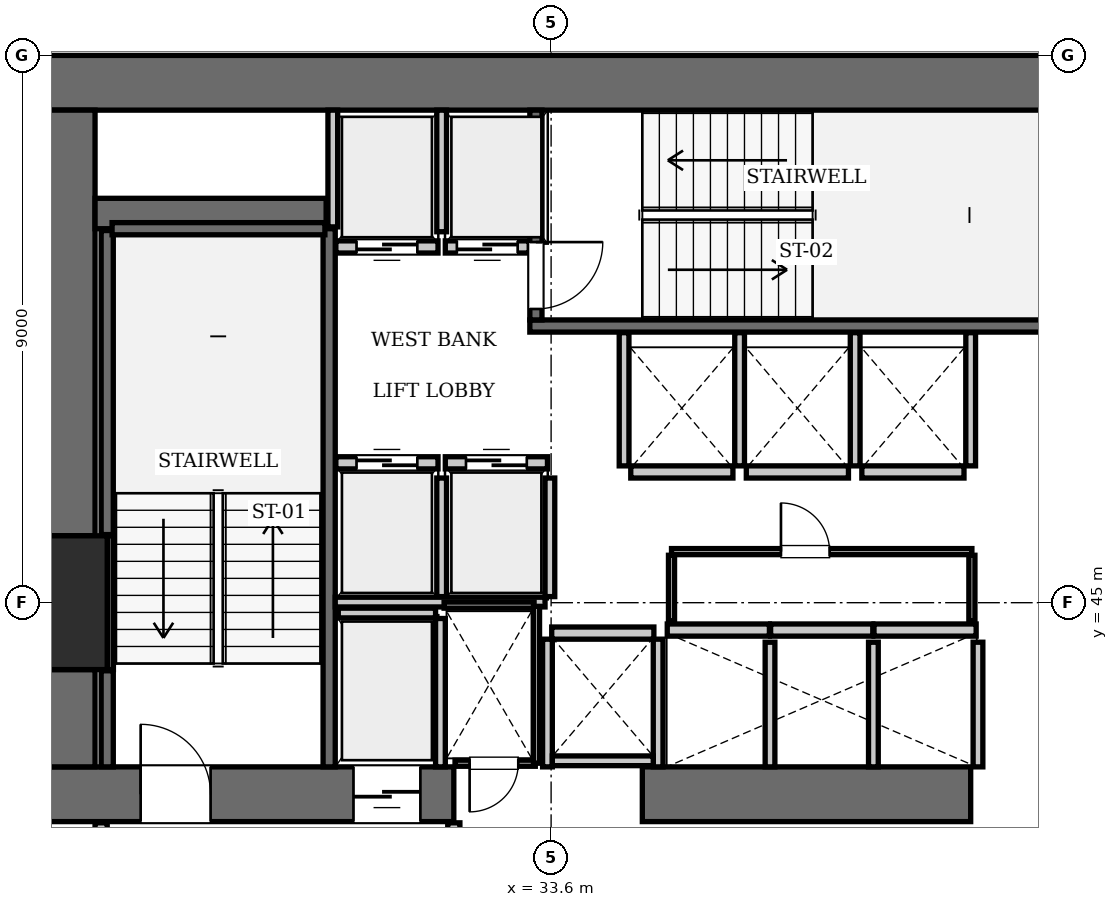
"""IFC4 building model, lengths in metres.
Left out: names, types, materials, properties, quantities, classifications, styles, units other than length and angle.
Written with IfcOpenShell. Run it as: python <this file> out.ifc"""

import sys

from ifc_helpers import new_model, si_unit, direction, frame, frame_2d, origin, origin_2d, place, context, subcontext, project, spatial, rectangle, extrude, element, fill, save


model = new_model("IFC4")
c1 = context("Model", 3, precision=1e-05, world=origin(), true_north=direction((0.0, 1.0)))
c2 = subcontext(c1, "Body", "Model", "MODEL_VIEW")
j1 = project(units=[si_unit("LENGTHUNIT", "METRE"), si_unit("PLANEANGLEUNIT", "RADIAN")], contexts=[c1])
p1 = place(None, origin())
s1 = spatial("IfcSite", under=j1, at=p1, CompositionType="ELEMENT")
p2 = place(p1, origin())
s2 = spatial("IfcBuilding", under=s1, at=p2, CompositionType="ELEMENT")
p3 = place(p2, frame((0.0, 0.0, 111.65)))
s3 = spatial("IfcBuildingStorey", under=s2, at=p3, CompositionType="ELEMENT", Elevation=111.65)
p4 = place(p3, frame((25.2, 45.0, 0.0), z_axis=(0.0, 0.0, 1.0), x_axis=(1.0, 0.0, 0.0)))
e1 = element("IfcColumn", 1, at=p4, inside=s3, PredefinedType="COLUMN", context=c2, shape_type="SweptSolid", body=[
    extrude(rectangle(XDim=2.2, YDim=2.2, at=origin_2d()), origin(), (0.0, 0.0, 1.0), 3.85),
])
p5 = place(p3, frame((25.2, 53.55, 0.0), z_axis=(0.0, 0.0, 1.0), x_axis=(1.0, 0.0, 0.0)))
e2 = element("IfcWall", 2, at=p5, inside=s3, PredefinedType="SHEAR", context=c2, shape_type="SweptSolid", body=[
    extrude(rectangle(XDim=25.2, YDim=0.9, at=frame_2d((12.6, 0.0))), origin(), (0.0, 0.0, 1.0), 3.85),
])
p6 = place(p3, frame((25.2, 41.85, 0.0), z_axis=(0.0, 0.0, 1.0), x_axis=(1.0, 0.0, 0.0)))
e3 = element("IfcWall", 3, at=p6, inside=s3, PredefinedType="SHEAR", context=c2, shape_type="SweptSolid", body=[
    extrude(rectangle(XDim=6.8, YDim=0.9, at=frame_2d((3.4, 0.0))), origin(), (0.0, 0.0, 1.0), 3.85),
])
p7 = place(p6, frame((1.65, 0.0, 0.0)))
e4 = element("IfcOpeningElement", 4, at=p7, cuts=e3, PredefinedType="OPENING", context=c2, shape_type="SweptSolid", body=[
    extrude(rectangle(XDim=1.15, YDim=2.15, at=frame_2d((0.575, 1.075))), frame((0.0, 0.46, 0.0), z_axis=(0.0, -1.0, 0.0), x_axis=(1.0, 0.0, 0.0)), (0.0, 0.0, 1.0), 0.92),
])
p8 = place(p6, frame((5.15, 0.0, 0.0)))
e5 = element("IfcOpeningElement", 5, at=p8, cuts=e3, PredefinedType="OPENING", context=c2, shape_type="SweptSolid", body=[
    extrude(rectangle(XDim=1.1, YDim=2.2, at=frame_2d((0.55, 1.1))), frame((0.0, 0.46, 0.0), z_axis=(0.0, -1.0, 0.0), x_axis=(1.0, 0.0, 0.0)), (0.0, 0.0, 1.0), 0.92),
])
p9 = place(p3, frame((35.1, 41.85, 0.0), z_axis=(0.0, 0.0, 1.0), x_axis=(1.0, 0.0, 0.0)))
e6 = element("IfcWall", 6, at=p9, inside=s3, PredefinedType="SHEAR", context=c2, shape_type="SweptSolid", body=[
    extrude(rectangle(XDim=5.4, YDim=0.9, at=frame_2d((2.7, 0.0))), origin(), (0.0, 0.0, 1.0), 3.85),
])
p10 = place(p3, frame((25.65, 42.3, 0.0), z_axis=(0.0, 0.0, 1.0), x_axis=(0.0, 1.0, 0.0)))
e7 = element("IfcWall", 7, at=p10, inside=s3, PredefinedType="SHEAR", context=c2, shape_type="SweptSolid", body=[
    extrude(rectangle(XDim=1.6, YDim=0.9, at=frame_2d((0.8, 0.0))), origin(), (0.0, 0.0, 1.0), 3.85),
])
p11 = place(p3, frame((25.65, 46.1, 0.0), z_axis=(0.0, 0.0, 1.0), x_axis=(0.0, 1.0, 0.0)))
e8 = element("IfcWall", 8, at=p11, inside=s3, PredefinedType="SHEAR", context=c2, shape_type="SweptSolid", body=[
    extrude(rectangle(XDim=7.0, YDim=0.9, at=frame_2d((3.5, 0.0))), origin(), (0.0, 0.0, 1.0), 3.85),
])
p12 = place(p3, frame((26.1, 51.4, 0.0), z_axis=(0.0, 0.0, 1.0), x_axis=(1.0, 0.0, 0.0)))
e9 = element("IfcWall", 9, at=p12, inside=s3, PredefinedType="SHEAR", context=c2, shape_type="SweptSolid", body=[
    extrude(rectangle(XDim=3.8, YDim=0.5, at=frame_2d((1.9, 0.0))), origin(), (0.0, 0.0, 1.0), 3.85),
])
p13 = place(p3, frame((29.95, 42.3, 0.0), z_axis=(0.0, 0.0, 1.0), x_axis=(0.0, 1.0, 0.0)))
e10 = element("IfcWall", 10, at=p13, inside=s3, PredefinedType="SOLIDWALL", context=c2, shape_type="SweptSolid", body=[
    extrude(rectangle(XDim=8.85, YDim=0.2, at=frame_2d((4.425, 0.0))), origin(), (0.0, 0.0, 1.0), 3.55),
])
p14 = place(p3, frame((26.3, 42.3, 0.0), z_axis=(0.0, 0.0, 1.0), x_axis=(0.0, 1.0, 0.0)))
e11 = element("IfcWall", 11, at=p14, inside=s3, PredefinedType="SOLIDWALL", context=c2, shape_type="SweptSolid", body=[
    extrude(rectangle(XDim=1.58, YDim=0.2, at=frame_2d((0.79, 0.0))), origin(), (0.0, 0.0, 1.0), 3.55),
])
p15 = place(p3, frame((26.3, 46.12, 0.0), z_axis=(0.0, 0.0, 1.0), x_axis=(0.0, 1.0, 0.0)))
e12 = element("IfcWall", 12, at=p15, inside=s3, PredefinedType="SOLIDWALL", context=c2, shape_type="SweptSolid", body=[
    extrude(rectangle(XDim=5.0, YDim=0.2, at=frame_2d((2.5, 0.0))), origin(), (0.0, 0.0, 1.0), 3.55),
])
p16 = place(p3, frame((26.38, 51.15, 0.0), z_axis=(0.0, 0.0, 1.0), x_axis=(1.0, 0.0, 0.0)))
e13 = element("IfcWall", 13, at=p16, inside=s3, PredefinedType="SOLIDWALL", context=c2, shape_type="SweptSolid", body=[
    extrude(rectangle(XDim=3.5, YDim=0.2, at=frame_2d((1.75, 0.0))), origin(), (0.0, 0.0, 1.0), 3.55),
])
p17 = place(p3, frame((26.352, 43.9, 0.0), z_axis=(0.0, 0.0, 1.0), x_axis=(0.0, 1.0, 0.0)))
e14 = element("IfcWall", 14, at=p17, inside=s3, PredefinedType="SOLIDWALL", context=c2, shape_type="SweptSolid", body=[
    extrude(rectangle(XDim=2.2, YDim=0.1, at=frame_2d((1.1, 0.0))), origin(), (0.0, 0.0, 1.0), 3.55),
])
p18 = place(p3, frame((33.25, 49.55, 0.0), z_axis=(0.0, 0.0, 1.0), x_axis=(1.0, 0.0, 0.0)))
e15 = element("IfcWall", 15, at=p18, inside=s3, PredefinedType="SOLIDWALL", context=c2, shape_type="SweptSolid", body=[
    extrude(rectangle(XDim=9.1, YDim=0.2, at=frame_2d((4.55, 0.0))), origin(), (0.0, 0.0, 1.0), 3.55),
])
p19 = place(p3, frame((33.35, 49.65, 0.0), z_axis=(0.0, 0.0, 1.0), x_axis=(0.0, 1.0, 0.0)))
e16 = element("IfcWall", 16, at=p19, inside=s3, PredefinedType="SOLIDWALL", context=c2, shape_type="SweptSolid", body=[
    extrude(rectangle(XDim=3.45, YDim=0.2, at=frame_2d((1.725, 0.0))), origin(), (0.0, 0.0, 1.0), 3.55),
])
p20 = place(p19, frame((0.18, 0.0, 0.0)))
e17 = element("IfcOpeningElement", 17, at=p20, cuts=e16, PredefinedType="OPENING", context=c2, shape_type="SweptSolid", body=[
    extrude(rectangle(XDim=1.1, YDim=2.15, at=frame_2d((0.55, 1.075))), frame((0.0, 0.11, 0.0), z_axis=(0.0, -1.0, 0.0), x_axis=(1.0, 0.0, 0.0)), (0.0, 0.0, 1.0), 0.22),
])
p21 = place(p3, frame((30.06, 47.3, 0.0), z_axis=(0.0, 0.0, 1.0), x_axis=(1.0, 0.0, 0.0)))
e18 = element("IfcWall", 18, at=p21, inside=s3, PredefinedType="SOLIDWALL", context=c2, shape_type="SweptSolid", body=[
    extrude(rectangle(XDim=1.68, YDim=0.2, at=frame_2d((0.84, 0.0))), origin(), (0.0, 0.0, 1.0), 3.55),
])
p22 = place(p21, frame((0.34, 0.0, 0.0)))
e19 = element("IfcOpeningElement", 19, at=p22, cuts=e18, PredefinedType="OPENING", context=c2, shape_type="SweptSolid", body=[
    extrude(rectangle(XDim=1.0, YDim=2.15, at=frame_2d((0.5, 1.075))), frame((0.0, 0.11, 0.0), z_axis=(0.0, -1.0, 0.0), x_axis=(1.0, 0.0, 0.0)), (0.0, 0.0, 1.0), 0.22),
])
p23 = place(p3, frame((31.86, 47.3, 0.0), z_axis=(0.0, 0.0, 1.0), x_axis=(1.0, 0.0, 0.0)))
e20 = element("IfcWall", 20, at=p23, inside=s3, PredefinedType="SOLIDWALL", context=c2, shape_type="SweptSolid", body=[
    extrude(rectangle(XDim=1.68, YDim=0.2, at=frame_2d((0.84, 0.0))), origin(), (0.0, 0.0, 1.0), 3.55),
])
p24 = place(p23, frame((0.34, 0.0, 0.0)))
e21 = element("IfcOpeningElement", 21, at=p24, cuts=e20, PredefinedType="OPENING", context=c2, shape_type="SweptSolid", body=[
    extrude(rectangle(XDim=1.0, YDim=2.15, at=frame_2d((0.5, 1.075))), frame((0.0, 0.11, 0.0), z_axis=(0.0, -1.0, 0.0), x_axis=(1.0, 0.0, 0.0)), (0.0, 0.0, 1.0), 0.22),
])
p25 = place(p3, frame((30.06, 50.85, 0.0), z_axis=(0.0, 0.0, 1.0), x_axis=(1.0, 0.0, 0.0)))
e22 = element("IfcWall", 22, at=p25, inside=s3, PredefinedType="SOLIDWALL", context=c2, shape_type="SweptSolid", body=[
    extrude(rectangle(XDim=1.68, YDim=0.2, at=frame_2d((0.84, 0.0))), origin(), (0.0, 0.0, 1.0), 3.55),
])
p26 = place(p25, frame((0.34, 0.0, 0.0)))
e23 = element("IfcOpeningElement", 23, at=p26, cuts=e22, PredefinedType="OPENING", context=c2, shape_type="SweptSolid", body=[
    extrude(rectangle(XDim=1.0, YDim=2.15, at=frame_2d((0.5, 1.075))), frame((0.0, 0.11, 0.0), z_axis=(0.0, -1.0, 0.0), x_axis=(1.0, 0.0, 0.0)), (0.0, 0.0, 1.0), 0.22),
])
p27 = place(p3, frame((31.86, 50.85, 0.0), z_axis=(0.0, 0.0, 1.0), x_axis=(1.0, 0.0, 0.0)))
e24 = element("IfcWall", 24, at=p27, inside=s3, PredefinedType="SOLIDWALL", context=c2, shape_type="SweptSolid", body=[
    extrude(rectangle(XDim=1.38, YDim=0.2, at=frame_2d((0.69, 0.0))), origin(), (0.0, 0.0, 1.0), 3.55),
])
p28 = place(p27, frame((0.19, 0.0, 0.0)))
e25 = element("IfcOpeningElement", 25, at=p28, cuts=e24, PredefinedType="OPENING", context=c2, shape_type="SweptSolid", body=[
    extrude(rectangle(XDim=1.0, YDim=2.15, at=frame_2d((0.5, 1.075))), frame((0.0, 0.11, 0.0), z_axis=(0.0, -1.0, 0.0), x_axis=(1.0, 0.0, 0.0)), (0.0, 0.0, 1.0), 0.22),
])
for number, where, z_axis, x_axis in (
    (26, (35.51, 44.55, 0.0), (0.0, 0.0, 1.0), (1.0, 0.0, 0.0)),
    (27, (37.21, 44.55, 0.0), (0.0, 0.0, 1.0), (1.0, 0.0, 0.0)),
):
    element("IfcWall", number, at=place(p3, frame(where, z_axis=z_axis, x_axis=x_axis)), inside=s3, PredefinedType="SOLIDWALL", context=c2, shape_type="SweptSolid", body=[
        extrude(rectangle(XDim=1.68, YDim=0.2, at=frame_2d((0.84, 0.0))), origin(), (0.0, 0.0, 1.0), 3.55),
    ])
for number, where, z_axis, x_axis in (
    (28, (38.91, 44.55, 0.0), (0.0, 0.0, 1.0), (1.0, 0.0, 0.0)),
    (29, (34.91, 47.15, 0.0), (0.0, 0.0, 1.0), (1.0, 0.0, 0.0)),
):
    element("IfcWall", number, at=place(p3, frame(where, z_axis=z_axis, x_axis=x_axis)), inside=s3, PredefinedType="SOLIDWALL", context=c2, shape_type="SweptSolid", body=[
        extrude(rectangle(XDim=1.68, YDim=0.2, at=frame_2d((0.84, 0.0))), origin(), (0.0, 0.0, 1.0), 3.55),
    ])
for number, where, z_axis, x_axis in (
    (30, (36.81, 47.15, 0.0), (0.0, 0.0, 1.0), (1.0, 0.0, 0.0)),
    (31, (38.71, 47.15, 0.0), (0.0, 0.0, 1.0), (1.0, 0.0, 0.0)),
    (32, (33.61, 44.5, 0.0), (0.0, 0.0, 1.0), (1.0, 0.0, 0.0)),
):
    element("IfcWall", number, at=place(p3, frame(where, z_axis=z_axis, x_axis=x_axis)), inside=s3, PredefinedType="SOLIDWALL", context=c2, shape_type="SweptSolid", body=[
        extrude(rectangle(XDim=1.68, YDim=0.2, at=frame_2d((0.84, 0.0))), origin(), (0.0, 0.0, 1.0), 3.55),
    ])
p29 = place(p3, frame((30.1, 44.83, 0.0), z_axis=(0.0, 0.0, 1.0), x_axis=(1.0, 0.0, 0.0)))
e33 = element("IfcWall", 33, at=p29, inside=s3, PredefinedType="SOLIDWALL", context=c2, shape_type="SweptSolid", body=[
    extrude(rectangle(XDim=1.6, YDim=0.16, at=frame_2d((0.8, 0.0))), origin(), (0.0, 0.0, 1.0), 3.55),
])
p30 = place(p3, frame((31.78, 42.3, 0.0), z_axis=(0.0, 0.0, 1.0), x_axis=(0.0, 1.0, 0.0)))
e34 = element("IfcWall", 34, at=p30, inside=s3, PredefinedType="SOLIDWALL", context=c2, shape_type="SweptSolid", body=[
    extrude(rectangle(XDim=2.44, YDim=0.16, at=frame_2d((1.22, 0.0))), origin(), (0.0, 0.0, 1.0), 3.55),
])
for number, where, z_axis, x_axis in (
    (35, (31.8, 45.1, 0.0), (0.0, 0.0, 1.0), (0.0, 1.0, 0.0)),
    (36, (33.58, 45.1, 0.0), (0.0, 0.0, 1.0), (0.0, 1.0, 0.0)),
):
    element("IfcWall", number, at=place(p3, frame(where, z_axis=z_axis, x_axis=x_axis)), inside=s3, PredefinedType="SOLIDWALL", context=c2, shape_type="SweptSolid", body=[
        extrude(rectangle(XDim=1.95, YDim=0.16, at=frame_2d((0.975, 0.0))), origin(), (0.0, 0.0, 1.0), 3.55),
    ])
p31 = place(p3, frame((30.05, 45.01, 0.0), z_axis=(0.0, 0.0, 1.0), x_axis=(1.0, 0.0, 0.0)))
e37 = element("IfcWall", 37, at=p31, inside=s3, PredefinedType="SOLIDWALL", context=c2, shape_type="SweptSolid", body=[
    extrude(rectangle(XDim=3.45, YDim=0.16, at=frame_2d((1.725, 0.0))), origin(), (0.0, 0.0, 1.0), 3.55),
])
p32 = place(p3, frame((30.01, 51.18, 0.0), z_axis=(0.0, 0.0, 1.0), x_axis=(0.0, 1.0, 0.0)))
e38 = element("IfcWall", 38, at=p32, inside=s3, PredefinedType="SOLIDWALL", context=c2, shape_type="SweptSolid", body=[
    extrude(rectangle(XDim=1.92, YDim=0.16, at=frame_2d((0.96, 0.0))), origin(), (0.0, 0.0, 1.0), 3.55),
])
p33 = place(p3, frame((31.8, 51.1, 0.0), z_axis=(0.0, 0.0, 1.0), x_axis=(0.0, 1.0, 0.0)))
e39 = element("IfcWall", 39, at=p33, inside=s3, PredefinedType="SOLIDWALL", context=c2, shape_type="SweptSolid", body=[
    extrude(rectangle(XDim=2.0, YDim=0.16, at=frame_2d((1.0, 0.0))), origin(), (0.0, 0.0, 1.0), 3.55),
])
for number, where, z_axis, x_axis in (
    (40, (37.2, 42.3, 0.0), (0.0, 0.0, 1.0), (0.0, 1.0, 0.0)),
    (41, (38.9, 42.3, 0.0), (0.0, 0.0, 1.0), (0.0, 1.0, 0.0)),
    (42, (40.62, 42.3, 0.0), (0.0, 0.0, 1.0), (0.0, 1.0, 0.0)),
):
    element("IfcWall", number, at=place(p3, frame(where, z_axis=z_axis, x_axis=x_axis)), inside=s3, PredefinedType="SOLIDWALL", context=c2, shape_type="SweptSolid", body=[
        extrude(rectangle(XDim=2.05, YDim=0.16, at=frame_2d((1.025, 0.0))), origin(), (0.0, 0.0, 1.0), 3.55),
    ])
for number, where, z_axis, x_axis in (
    (43, (34.8, 47.25, 0.0), (0.0, 0.0, 1.0), (0.0, 1.0, 0.0)),
    (44, (36.7, 47.25, 0.0), (0.0, 0.0, 1.0), (0.0, 1.0, 0.0)),
    (45, (38.6, 47.25, 0.0), (0.0, 0.0, 1.0), (0.0, 1.0, 0.0)),
    (46, (40.5, 47.25, 0.0), (0.0, 0.0, 1.0), (0.0, 1.0, 0.0)),
):
    element("IfcWall", number, at=place(p3, frame(where, z_axis=z_axis, x_axis=x_axis)), inside=s3, PredefinedType="SOLIDWALL", context=c2, shape_type="SweptSolid", body=[
        extrude(rectangle(XDim=2.19, YDim=0.16, at=frame_2d((1.095, 0.0))), origin(), (0.0, 0.0, 1.0), 3.55),
    ])
for number, where, z_axis, x_axis in (
    (47, (33.54, 42.3, 0.0), (0.0, 0.0, 1.0), (0.0, 1.0, 0.0)),
    (48, (35.36, 42.3, 0.0), (0.0, 0.0, 1.0), (0.0, 1.0, 0.0)),
):
    element("IfcWall", number, at=place(p3, frame(where, z_axis=z_axis, x_axis=x_axis)), inside=s3, PredefinedType="SOLIDWALL", context=c2, shape_type="SweptSolid", body=[
        extrude(rectangle(XDim=2.1, YDim=0.16, at=frame_2d((1.05, 0.0))), origin(), (0.0, 0.0, 1.0), 3.55),
    ])
p34 = place(p3, frame((33.62, 42.4, 0.0), z_axis=(0.0, 0.0, 1.0), x_axis=(1.0, 0.0, 0.0)))
e49 = element("IfcWall", 49, at=p34, inside=s3, PredefinedType="SOLIDWALL", context=c2, shape_type="SweptSolid", body=[
    extrude(rectangle(XDim=1.66, YDim=0.16, at=frame_2d((0.83, 0.0))), origin(), (0.0, 0.0, 1.0), 3.55),
])
for number, where, z_axis, x_axis in (
    (50, (26.2, 38.31, 0.0), (0.0, 0.0, 1.0), (0.0, 1.0, 0.0)),
    (51, (32.0, 38.31, 0.0), (0.0, 0.0, 1.0), (0.0, 1.0, 0.0)),
):
    element("IfcWall", number, at=place(p3, frame(where, z_axis=z_axis, x_axis=x_axis)), inside=s3, PredefinedType="PARTITIONING", context=c2, shape_type="SweptSolid", body=[
        extrude(rectangle(XDim=3.07, YDim=0.2, at=frame_2d((1.535, 0.0))), origin(), (0.0, 0.0, 1.0), 3.55),
    ])
p35 = place(p3, frame((32.02, 42.36, 0.0), z_axis=(0.0, 0.0, 1.0), x_axis=(1.0, 0.0, 0.0)))
e52 = element("IfcWall", 52, at=p35, inside=s3, PredefinedType="PARTITIONING", context=c2, shape_type="SweptSolid", body=[
    extrude(rectangle(XDim=1.32, YDim=0.1, at=frame_2d((0.66, 0.0))), origin(), (0.0, 0.0, 1.0), 3.55),
])
p36 = place(p35, frame((0.24, 0.0, 0.0)))
e53 = element("IfcOpeningElement", 53, at=p36, cuts=e52, PredefinedType="OPENING", context=c2, shape_type="SweptSolid", body=[
    extrude(rectangle(XDim=0.8, YDim=2.05, at=frame_2d((0.4, 1.025))), frame((0.0, 0.06, 0.0), z_axis=(0.0, -1.0, 0.0), x_axis=(1.0, 0.0, 0.0)), (0.0, 0.0, 1.0), 0.12),
])
p37 = place(p3, frame((31.84, 44.96, 0.0), z_axis=(0.0, 0.0, 1.0), x_axis=(1.0, 0.0, 0.0)))
e54 = element("IfcWall", 54, at=p37, inside=s3, PredefinedType="PARTITIONING", context=c2, shape_type="SweptSolid", body=[
    extrude(rectangle(XDim=1.48, YDim=0.1, at=frame_2d((0.74, 0.0))), origin(), (0.0, 0.0, 1.0), 3.55),
])
p38 = place(p3, frame((33.36, 42.36, 0.0), z_axis=(0.0, 0.0, 1.0), x_axis=(0.0, 1.0, 0.0)))
e55 = element("IfcWall", 55, at=p38, inside=s3, PredefinedType="PARTITIONING", context=c2, shape_type="SweptSolid", body=[
    extrude(rectangle(XDim=2.58, YDim=0.1, at=frame_2d((1.29, 0.0))), origin(), (0.0, 0.0, 1.0), 3.55),
])
p39 = place(p3, frame((35.58, 45.84, 0.0), z_axis=(0.0, 0.0, 1.0), x_axis=(1.0, 0.0, 0.0)))
e56 = element("IfcWall", 56, at=p39, inside=s3, PredefinedType="PARTITIONING", context=c2, shape_type="SweptSolid", body=[
    extrude(rectangle(XDim=4.94, YDim=0.1, at=frame_2d((2.47, 0.0))), origin(), (0.0, 0.0, 1.0), 3.55),
])
p40 = place(p39, frame((1.8, 0.0, 0.0)))
e57 = element("IfcOpeningElement", 57, at=p40, cuts=e56, PredefinedType="OPENING", context=c2, shape_type="SweptSolid", body=[
    extrude(rectangle(XDim=0.8, YDim=2.05, at=frame_2d((0.4, 1.025))), frame((0.0, 0.06, 0.0), z_axis=(0.0, -1.0, 0.0), x_axis=(1.0, 0.0, 0.0)), (0.0, 0.0, 1.0), 0.12),
])
for number, where, z_axis, x_axis in (
    (58, (35.58, 44.7, 0.0), (0.0, 0.0, 1.0), (0.0, 1.0, 0.0)),
    (59, (40.52, 44.7, 0.0), (0.0, 0.0, 1.0), (0.0, 1.0, 0.0)),
):
    element("IfcWall", number, at=place(p3, frame(where, z_axis=z_axis, x_axis=x_axis)), inside=s3, PredefinedType="PARTITIONING", context=c2, shape_type="SweptSolid", body=[
        extrude(rectangle(XDim=1.08, YDim=0.1, at=frame_2d((0.54, 0.0))), origin(), (0.0, 0.0, 1.0), 3.55),
    ])
p41 = place(p7, origin())
e60 = element("IfcDoor", 60, at=p41, inside=s3, OperationType="SINGLE_SWING_LEFT", PredefinedType="DOOR", context=c2, shape_type="SweptSolid", body=[
    extrude(rectangle(XDim=1.15, YDim=2.15, at=frame_2d((0.575, 1.075))), frame((0.0, 0.025, 0.0), z_axis=(0.0, -1.0, 0.0), x_axis=(1.0, 0.0, 0.0)), (0.0, 0.0, 1.0), 0.05),
])
fill(e4, e60)
p42 = place(p20, frame((1.1, 0.0, 0.0), z_axis=(0.0, 0.0, 1.0), x_axis=(-1.0, 0.0, 0.0)))
e61 = element("IfcDoor", 61, at=p42, inside=s3, OperationType="SINGLE_SWING_LEFT", PredefinedType="DOOR", context=c2, shape_type="SweptSolid", body=[
    extrude(rectangle(XDim=1.1, YDim=2.15, at=frame_2d((0.55, 1.075))), frame((0.0, 0.025, 0.0), z_axis=(0.0, -1.0, 0.0), x_axis=(1.0, 0.0, 0.0)), (0.0, 0.0, 1.0), 0.05),
])
fill(e17, e61)
p43 = place(p22, origin())
e62 = element("IfcDoor", 62, at=p43, inside=s3, OperationType="SLIDING_TO_LEFT", PredefinedType="DOOR", context=c2, shape_type="SweptSolid", body=[
    extrude(rectangle(XDim=1.0, YDim=2.15, at=frame_2d((0.5, 1.075))), frame((0.0, 0.025, 0.0), z_axis=(0.0, -1.0, 0.0), x_axis=(1.0, 0.0, 0.0)), (0.0, 0.0, 1.0), 0.05),
])
fill(e19, e62)
p44 = place(p24, origin())
e63 = element("IfcDoor", 63, at=p44, inside=s3, OperationType="SLIDING_TO_LEFT", PredefinedType="DOOR", context=c2, shape_type="SweptSolid", body=[
    extrude(rectangle(XDim=1.0, YDim=2.15, at=frame_2d((0.5, 1.075))), frame((0.0, 0.025, 0.0), z_axis=(0.0, -1.0, 0.0), x_axis=(1.0, 0.0, 0.0)), (0.0, 0.0, 1.0), 0.05),
])
fill(e21, e63)
p45 = place(p26, frame((1.0, 0.0, 0.0), z_axis=(0.0, 0.0, 1.0), x_axis=(-1.0, 0.0, 0.0)))
e64 = element("IfcDoor", 64, at=p45, inside=s3, OperationType="SLIDING_TO_LEFT", PredefinedType="DOOR", context=c2, shape_type="SweptSolid", body=[
    extrude(rectangle(XDim=1.0, YDim=2.15, at=frame_2d((0.5, 1.075))), frame((0.0, 0.025, 0.0), z_axis=(0.0, -1.0, 0.0), x_axis=(1.0, 0.0, 0.0)), (0.0, 0.0, 1.0), 0.05),
])
fill(e23, e64)
p46 = place(p28, frame((1.0, 0.0, 0.0), z_axis=(0.0, 0.0, 1.0), x_axis=(-1.0, 0.0, 0.0)))
e65 = element("IfcDoor", 65, at=p46, inside=s3, OperationType="SLIDING_TO_LEFT", PredefinedType="DOOR", context=c2, shape_type="SweptSolid", body=[
    extrude(rectangle(XDim=1.0, YDim=2.15, at=frame_2d((0.5, 1.075))), frame((0.0, 0.025, 0.0), z_axis=(0.0, -1.0, 0.0), x_axis=(1.0, 0.0, 0.0)), (0.0, 0.0, 1.0), 0.05),
])
fill(e25, e65)
p47 = place(p8, frame((1.1, 0.0, 0.0), z_axis=(0.0, 0.0, 1.0), x_axis=(-1.0, 0.0, 0.0)))
e66 = element("IfcDoor", 66, at=p47, inside=s3, OperationType="SLIDING_TO_LEFT", PredefinedType="DOOR", context=c2, shape_type="SweptSolid", body=[
    extrude(rectangle(XDim=1.1, YDim=2.2, at=frame_2d((0.55, 1.1))), frame((0.0, 0.025, 0.0), z_axis=(0.0, -1.0, 0.0), x_axis=(1.0, 0.0, 0.0)), (0.0, 0.0, 1.0), 0.05),
])
fill(e5, e66)
p48 = place(p36, frame((0.8, 0.0, 0.0), z_axis=(0.0, 0.0, 1.0), x_axis=(-1.0, 0.0, 0.0)))
e67 = element("IfcDoor", 67, at=p48, inside=s3, OperationType="SINGLE_SWING_RIGHT", PredefinedType="DOOR", context=c2, shape_type="SweptSolid", body=[
    extrude(rectangle(XDim=0.8, YDim=2.05, at=frame_2d((0.4, 1.025))), frame((0.0, 0.025, 0.0), z_axis=(0.0, -1.0, 0.0), x_axis=(1.0, 0.0, 0.0)), (0.0, 0.0, 1.0), 0.05),
])
fill(e53, e67)
p49 = place(p40, origin())
e68 = element("IfcDoor", 68, at=p49, inside=s3, OperationType="SINGLE_SWING_LEFT", PredefinedType="DOOR", context=c2, shape_type="SweptSolid", body=[
    extrude(rectangle(XDim=0.8, YDim=2.05, at=frame_2d((0.4, 1.025))), frame((0.0, 0.025, 0.0), z_axis=(0.0, -1.0, 0.0), x_axis=(1.0, 0.0, 0.0)), (0.0, 0.0, 1.0), 0.05),
])
fill(e57, e68)
save(model, sys.argv[1])
